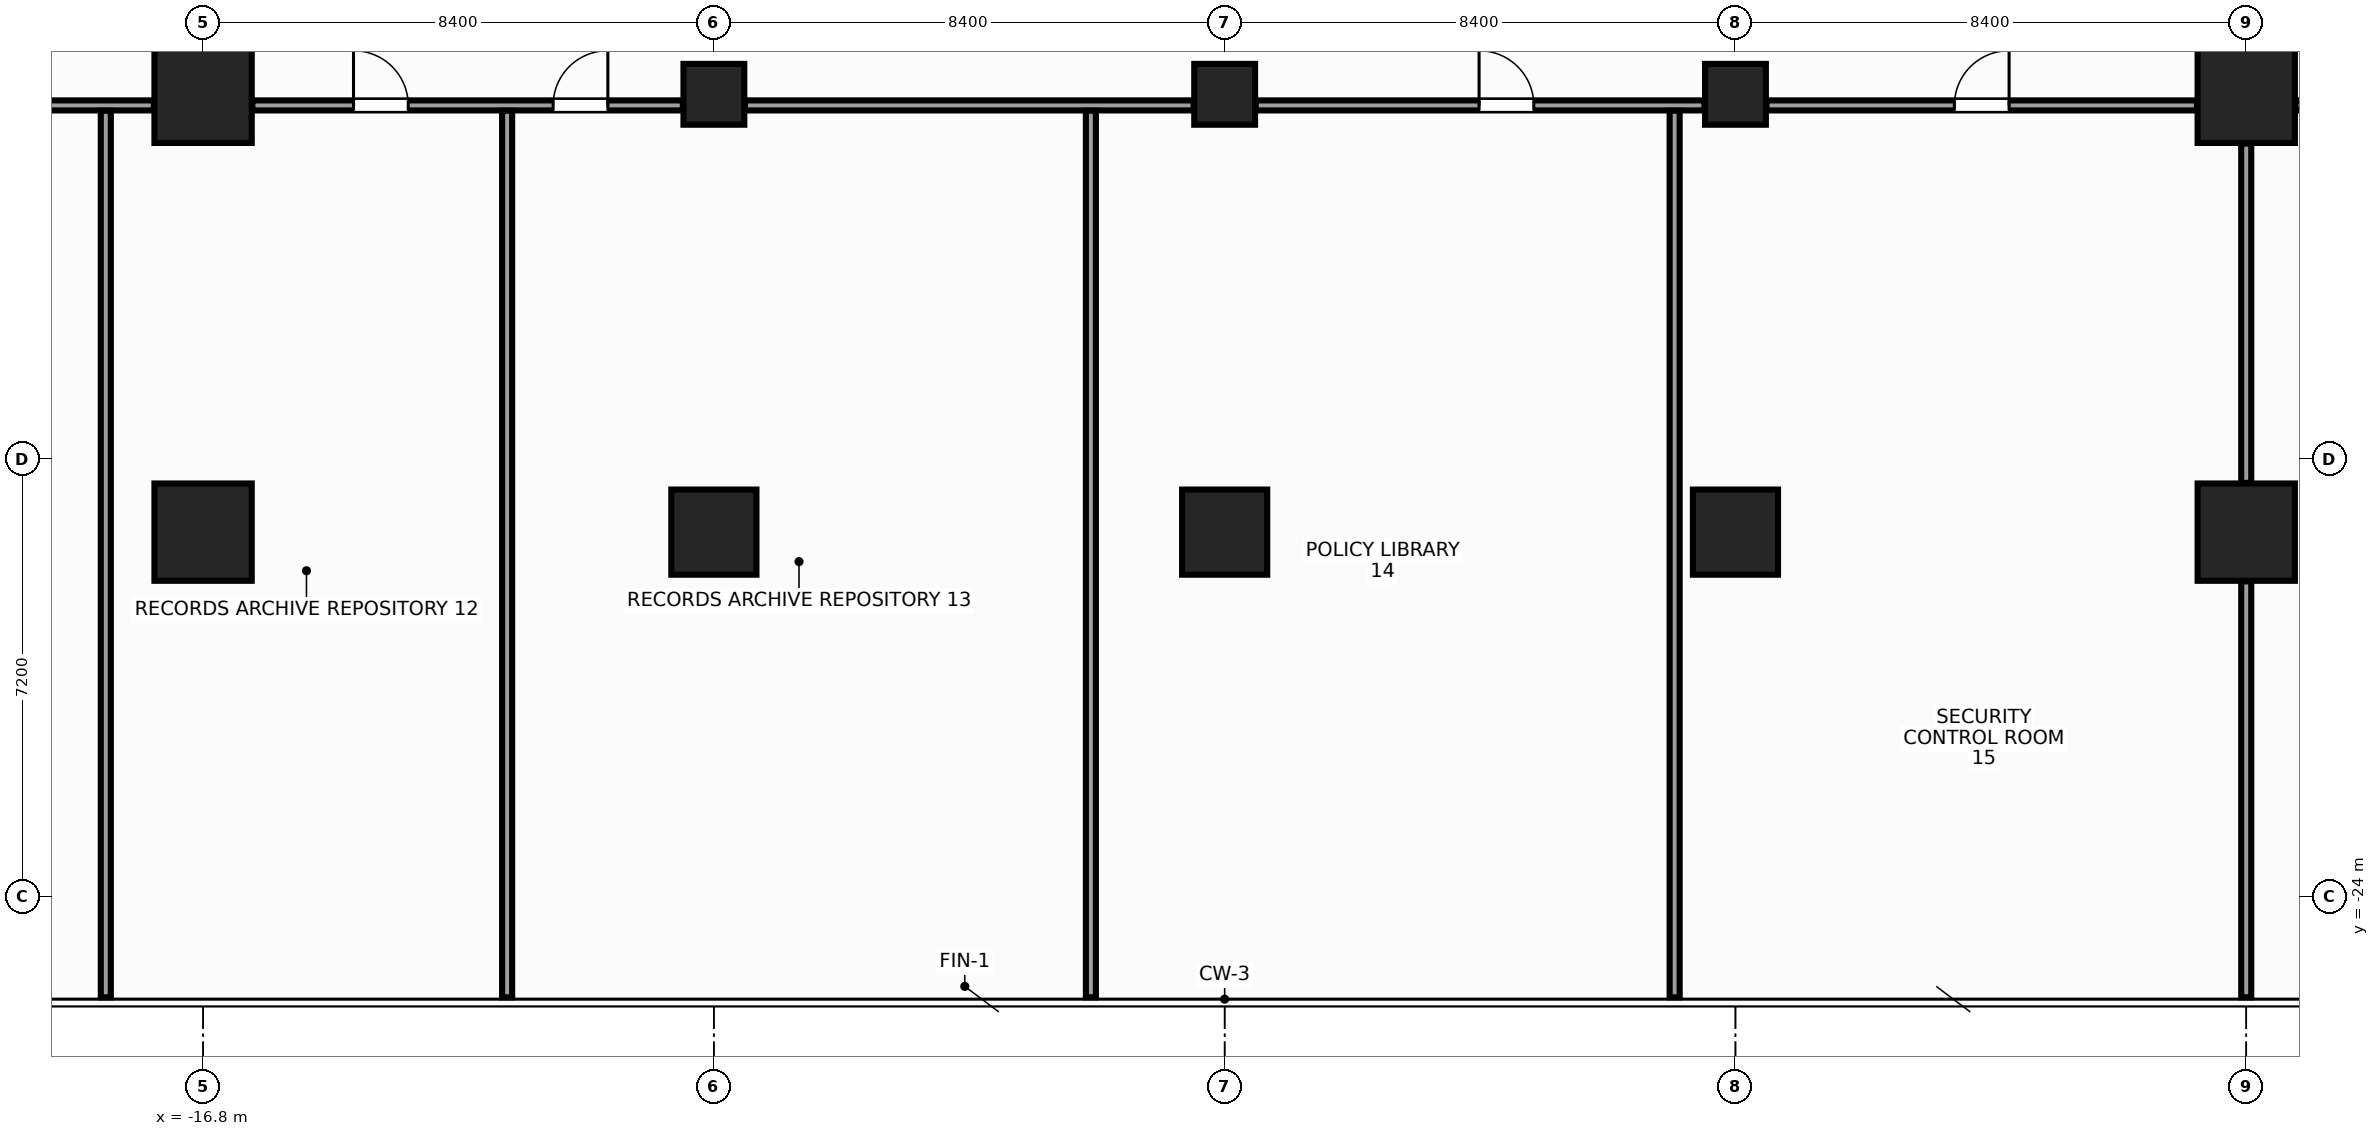
"""IFC4 building model, lengths in metres.
Left out: names, types, materials, properties, quantities, classifications, styles, units other than length and angle.
Written with IfcOpenShell. Run it as: python <this file> out.ifc"""

import sys

from ifc_helpers import new_model, si_unit, direction, frame, frame_2d, origin, origin_2d, place, context, subcontext, project, spatial, rectangle, hollow_rectangle, extrude, source, transform, mapped, element, fill, save


model = new_model("IFC4")
c1 = context("Model", 3, precision=1e-05, world=origin(), true_north=direction((0.0, 1.0)))
c2 = subcontext(c1, "Body", "Model", "MODEL_VIEW")
j1 = project(units=[si_unit("LENGTHUNIT", "METRE"), si_unit("PLANEANGLEUNIT", "RADIAN")], contexts=[c1])
p1 = place(None, origin())
s1 = spatial("IfcSite", under=j1, at=p1, CompositionType="ELEMENT")
p2 = place(p1, origin())
s2 = spatial("IfcBuilding", under=s1, at=p2, CompositionType="ELEMENT")
p3 = place(p2, frame((0.0, 0.0, 102.8)))
s3 = spatial("IfcBuildingStorey", under=s2, at=p3, CompositionType="ELEMENT", Elevation=102.8)
m1 = source(origin(), c2, "Body", "SweptSolid", [
    extrude(rectangle(XDim=1.6, YDim=1.6, at=origin_2d()), origin(), (0.0, 0.0, 1.0), 3.6),
])
for number, where, z_axis, x_axis in (
    (1, (-16.8, -18.0, 0.0), (0.0, 0.0, 1.0), (1.0, 0.0, 0.0)),
    (2, (-16.8, -10.8, 0.0), (0.0, 0.0, 1.0), (1.0, 0.0, 0.0)),
    (3, (16.8, -18.0, 0.0), (0.0, 0.0, 1.0), (1.0, 0.0, 0.0)),
    (4, (16.8, -10.8, 0.0), (0.0, 0.0, 1.0), (1.0, 0.0, 0.0)),
):
    element("IfcColumn", number, at=place(p3, frame(where, z_axis=z_axis, x_axis=x_axis)), inside=s3, PredefinedType="COLUMN", context=c2, shape_type="MappedRepresentation", body=[
        mapped(m1, transform((0.0, 0.0, 0.0), x_axis=(1.0, 0.0, 0.0), y_axis=(0.0, 1.0, 0.0), z_axis=(0.0, 0.0, 1.0), scale=1.0)),
    ])
m2 = source(origin(), c2, "Body", "SweptSolid", [
    extrude(rectangle(XDim=1.4, YDim=1.4, at=origin_2d()), origin(), (0.0, 0.0, 1.0), 3.6),
])
p4 = place(p3, frame((-8.4, -18.0, 0.0), z_axis=(0.0, 0.0, 1.0), x_axis=(1.0, 0.0, 0.0)))
e5 = element("IfcColumn", 5, at=p4, inside=s3, PredefinedType="COLUMN", context=c2, shape_type="MappedRepresentation", body=[
    mapped(m2, transform((0.0, 0.0, 0.0), x_axis=(1.0, 0.0, 0.0), y_axis=(0.0, 1.0, 0.0), z_axis=(0.0, 0.0, 1.0), scale=1.0)),
])
m3 = source(origin(), c2, "Body", "SweptSolid", [
    extrude(hollow_rectangle(XDim=1.0, YDim=1.0, WallThickness=0.045, at=origin_2d()), origin(), (0.0, 0.0, 1.0), 3.6),
])
p5 = place(p3, frame((-8.4, -10.8, 0.0), z_axis=(0.0, 0.0, 1.0), x_axis=(1.0, 0.0, 0.0)))
e6 = element("IfcColumn", 6, at=p5, inside=s3, PredefinedType="COLUMN", context=c2, shape_type="MappedRepresentation", body=[
    mapped(m3, transform((0.0, 0.0, 0.0), x_axis=(1.0, 0.0, 0.0), y_axis=(0.0, 1.0, 0.0), z_axis=(0.0, 0.0, 1.0), scale=1.0)),
])
p6 = place(p3, frame((8.4, -18.0, 0.0), z_axis=(0.0, 0.0, 1.0), x_axis=(1.0, 0.0, 0.0)))
e7 = element("IfcColumn", 7, at=p6, inside=s3, PredefinedType="COLUMN", context=c2, shape_type="MappedRepresentation", body=[
    mapped(m2, transform((0.0, 0.0, 0.0), x_axis=(1.0, 0.0, 0.0), y_axis=(0.0, 1.0, 0.0), z_axis=(0.0, 0.0, 1.0), scale=1.0)),
])
p7 = place(p3, frame((8.4, -10.8, 0.0), z_axis=(0.0, 0.0, 1.0), x_axis=(1.0, 0.0, 0.0)))
e8 = element("IfcColumn", 8, at=p7, inside=s3, PredefinedType="COLUMN", context=c2, shape_type="MappedRepresentation", body=[
    mapped(m3, transform((0.0, 0.0, 0.0), x_axis=(1.0, 0.0, 0.0), y_axis=(0.0, 1.0, 0.0), z_axis=(0.0, 0.0, 1.0), scale=1.0)),
])
p8 = place(p3, frame((0.0, -18.0, 0.0), z_axis=(0.0, 0.0, 1.0), x_axis=(1.0, 0.0, 0.0)))
e9 = element("IfcColumn", 9, at=p8, inside=s3, PredefinedType="COLUMN", context=c2, shape_type="MappedRepresentation", body=[
    mapped(m2, transform((0.0, 0.0, 0.0), x_axis=(1.0, 0.0, 0.0), y_axis=(0.0, 1.0, 0.0), z_axis=(0.0, 0.0, 1.0), scale=1.0)),
])
m4 = source(origin(), c2, "Body", "SweptSolid", [
    extrude(rectangle(XDim=1.0, YDim=1.0, at=origin_2d()), origin(), (0.0, 0.0, 1.0), 3.6),
])
p9 = place(p3, frame((0.0, -10.8, 0.0), z_axis=(0.0, 0.0, 1.0), x_axis=(1.0, 0.0, 0.0)))
e10 = element("IfcColumn", 10, at=p9, inside=s3, PredefinedType="COLUMN", context=c2, shape_type="MappedRepresentation", body=[
    mapped(m4, transform((0.0, 0.0, 0.0), x_axis=(1.0, 0.0, 0.0), y_axis=(0.0, 1.0, 0.0), z_axis=(0.0, 0.0, 1.0), scale=1.0)),
])
m5 = source(origin(), c2, "Body", "SweptSolid", [
    extrude(rectangle(XDim=3.155, YDim=0.165, at=frame_2d((1.577, 0.0))), origin(), (0.0, 0.0, 1.0), 2.745),
])
p10 = place(p3, frame((-20.765, -10.982, 0.0), z_axis=(0.0, 0.0, 1.0), x_axis=(1.0, 0.0, 0.0)))
e11 = element("IfcWall", 11, at=p10, inside=s3, PredefinedType="PARTITIONING", context=c2, shape_type="MappedRepresentation", body=[
    mapped(m5, transform((0.0, 0.0, 0.0), x_axis=(1.0, 0.0, 0.0), y_axis=(0.0, 1.0, 0.0), z_axis=(0.0, 0.0, 1.0), scale=1.0)),
])
m6 = source(origin(), c2, "Body", "SweptSolid", [
    extrude(rectangle(XDim=7.08, YDim=0.165, at=frame_2d((3.54, 0.0))), origin(), (0.0, 0.0, 1.0), 2.745),
])
p11 = place(p3, frame((-15.99, -10.982, 0.0), z_axis=(0.0, 0.0, 1.0), x_axis=(1.0, 0.0, 0.0)))
e12 = element("IfcWall", 12, at=p11, inside=s3, PredefinedType="PARTITIONING", context=c2, shape_type="MappedRepresentation", body=[
    mapped(m6, transform((0.0, 0.0, 0.0), x_axis=(1.0, 0.0, 0.0), y_axis=(0.0, 1.0, 0.0), z_axis=(0.0, 0.0, 1.0), scale=1.0)),
])
p12 = place(p11, frame((1.664, 0.0, 0.0)))
e13 = element("IfcOpeningElement", 13, at=p12, cuts=e12, PredefinedType="OPENING", context=c2, shape_type="SweptSolid", body=[
    extrude(rectangle(XDim=0.9, YDim=2.15, at=frame_2d((0.45, 1.075))), frame((0.0, 0.094, 0.0), z_axis=(0.0, -1.0, 0.0), x_axis=(1.0, 0.0, 0.0)), (0.0, 0.0, 1.0), 0.189),
])
p13 = place(p11, frame((4.946, 0.0, 0.0)))
e14 = element("IfcOpeningElement", 14, at=p13, cuts=e12, PredefinedType="OPENING", context=c2, shape_type="SweptSolid", body=[
    extrude(rectangle(XDim=0.9, YDim=2.15, at=frame_2d((0.45, 1.075))), frame((0.0, 0.094, 0.0), z_axis=(0.0, -1.0, 0.0), x_axis=(1.0, 0.0, 0.0)), (0.0, 0.0, 1.0), 0.189),
])
m7 = source(origin(), c2, "Body", "SweptSolid", [
    extrude(rectangle(XDim=7.38, YDim=0.165, at=frame_2d((3.69, 0.0))), origin(), (0.0, 0.0, 1.0), 2.745),
])
p14 = place(p3, frame((-7.89, -10.982, 0.0), z_axis=(0.0, 0.0, 1.0), x_axis=(1.0, 0.0, 0.0)))
e15 = element("IfcWall", 15, at=p14, inside=s3, PredefinedType="PARTITIONING", context=c2, shape_type="MappedRepresentation", body=[
    mapped(m7, transform((0.0, 0.0, 0.0), x_axis=(1.0, 0.0, 0.0), y_axis=(0.0, 1.0, 0.0), z_axis=(0.0, 0.0, 1.0), scale=1.0)),
])
p15 = place(p3, frame((0.51, -10.982, 0.0), z_axis=(0.0, 0.0, 1.0), x_axis=(1.0, 0.0, 0.0)))
e16 = element("IfcWall", 16, at=p15, inside=s3, PredefinedType="PARTITIONING", context=c2, shape_type="MappedRepresentation", body=[
    mapped(m7, transform((0.0, 0.0, 0.0), x_axis=(1.0, 0.0, 0.0), y_axis=(0.0, 1.0, 0.0), z_axis=(0.0, 0.0, 1.0), scale=1.0)),
])
p16 = place(p15, frame((3.674, 0.0, 0.0)))
e17 = element("IfcOpeningElement", 17, at=p16, cuts=e16, PredefinedType="OPENING", context=c2, shape_type="SweptSolid", body=[
    extrude(rectangle(XDim=0.9, YDim=2.15, at=frame_2d((0.45, 1.075))), frame((0.0, 0.094, 0.0), z_axis=(0.0, -1.0, 0.0), x_axis=(1.0, 0.0, 0.0)), (0.0, 0.0, 1.0), 0.189),
])
p17 = place(p3, frame((8.91, -10.982, 0.0), z_axis=(0.0, 0.0, 1.0), x_axis=(1.0, 0.0, 0.0)))
e18 = element("IfcWall", 18, at=p17, inside=s3, PredefinedType="PARTITIONING", context=c2, shape_type="MappedRepresentation", body=[
    mapped(m6, transform((0.0, 0.0, 0.0), x_axis=(1.0, 0.0, 0.0), y_axis=(0.0, 1.0, 0.0), z_axis=(0.0, 0.0, 1.0), scale=1.0)),
])
p18 = place(p17, frame((3.09, 0.0, 0.0)))
e19 = element("IfcOpeningElement", 19, at=p18, cuts=e18, PredefinedType="OPENING", context=c2, shape_type="SweptSolid", body=[
    extrude(rectangle(XDim=0.9, YDim=2.15, at=frame_2d((0.45, 1.075))), frame((0.0, 0.094, 0.0), z_axis=(0.0, -1.0, 0.0), x_axis=(1.0, 0.0, 0.0)), (0.0, 0.0, 1.0), 0.189),
])
p19 = place(p3, frame((17.61, -10.982, 0.0), z_axis=(0.0, 0.0, 1.0), x_axis=(1.0, 0.0, 0.0)))
e20 = element("IfcWall", 20, at=p19, inside=s3, PredefinedType="PARTITIONING", context=c2, shape_type="MappedRepresentation", body=[
    mapped(m5, transform((0.0, 0.0, 0.0), x_axis=(1.0, 0.0, 0.0), y_axis=(0.0, 1.0, 0.0), z_axis=(0.0, 0.0, 1.0), scale=1.0)),
])
m8 = source(origin(), c2, "Body", "SweptSolid", [
    extrude(rectangle(XDim=14.58, YDim=0.165, at=frame_2d((7.29, 0.0))), origin(), (0.0, 0.0, 1.0), 2.745),
])
for number, where, z_axis, x_axis in (
    (21, (-18.4, -25.65, 0.0), (0.0, 0.0, 1.0), (0.0, 1.0, 0.0)),
    (22, (-11.8, -25.65, 0.0), (0.0, 0.0, 1.0), (0.0, 1.0, 0.0)),
    (23, (-2.2, -25.65, 0.0), (0.0, 0.0, 1.0), (0.0, 1.0, 0.0)),
    (24, (7.4, -25.65, 0.0), (0.0, 0.0, 1.0), (0.0, 1.0, 0.0)),
):
    element("IfcWall", number, at=place(p3, frame(where, z_axis=z_axis, x_axis=x_axis)), inside=s3, PredefinedType="PARTITIONING", context=c2, shape_type="MappedRepresentation", body=[
        mapped(m8, transform((0.0, 0.0, 0.0), x_axis=(1.0, 0.0, 0.0), y_axis=(0.0, 1.0, 0.0), z_axis=(0.0, 0.0, 1.0), scale=1.0)),
    ])
m9 = source(origin(), c2, "Body", "SweptSolid", [
    extrude(rectangle(XDim=6.84, YDim=0.165, at=frame_2d((3.42, 0.0))), origin(), (0.0, 0.0, 1.0), 3.36),
])
p20 = place(p3, frame((16.8, -25.65, 0.0), z_axis=(0.0, 0.0, 1.0), x_axis=(0.0, 1.0, 0.0)))
e25 = element("IfcWall", 25, at=p20, inside=s3, PredefinedType="PARTITIONING", context=c2, shape_type="MappedRepresentation", body=[
    mapped(m9, transform((0.0, 0.0, 0.0), x_axis=(1.0, 0.0, 0.0), y_axis=(0.0, 1.0, 0.0), z_axis=(0.0, 0.0, 1.0), scale=1.0)),
])
m10 = source(origin(), c2, "Body", "SweptSolid", [
    extrude(rectangle(XDim=5.58, YDim=0.165, at=frame_2d((2.79, 0.0))), origin(), (0.0, 0.0, 1.0), 2.945),
])
p21 = place(p3, frame((16.8, -17.19, 0.0), z_axis=(0.0, 0.0, 1.0), x_axis=(0.0, 1.0, 0.0)))
e26 = element("IfcWall", 26, at=p21, inside=s3, PredefinedType="PARTITIONING", context=c2, shape_type="MappedRepresentation", body=[
    mapped(m10, transform((0.0, 0.0, 0.0), x_axis=(1.0, 0.0, 0.0), y_axis=(0.0, 1.0, 0.0), z_axis=(0.0, 0.0, 1.0), scale=1.0)),
])
m11 = source(origin(), c2, "Body", "SweptSolid", [
    extrude(rectangle(XDim=0.9, YDim=2.15, at=frame_2d((0.45, 1.075))), frame((0.0, 0.025, 0.0), z_axis=(0.0, -1.0, 0.0), x_axis=(1.0, 0.0, 0.0)), (0.0, 0.0, 1.0), 0.05),
])
p22 = place(p12, origin())
e27 = element("IfcDoor", 27, at=p22, inside=s3, OperationType="SINGLE_SWING_LEFT", PredefinedType="DOOR", context=c2, shape_type="MappedRepresentation", body=[
    mapped(m11, transform((0.0, 0.0, 0.0), x_axis=(1.0, 0.0, 0.0), y_axis=(0.0, 1.0, 0.0), z_axis=(0.0, 0.0, 1.0), scale=1.0)),
])
fill(e13, e27)
p23 = place(p13, origin())
e28 = element("IfcDoor", 28, at=p23, inside=s3, OperationType="SINGLE_SWING_RIGHT", PredefinedType="DOOR", context=c2, shape_type="MappedRepresentation", body=[
    mapped(m11, transform((0.0, 0.0, 0.0), x_axis=(1.0, 0.0, 0.0), y_axis=(0.0, 1.0, 0.0), z_axis=(0.0, 0.0, 1.0), scale=1.0)),
])
fill(e14, e28)
p24 = place(p16, origin())
e29 = element("IfcDoor", 29, at=p24, inside=s3, OperationType="SINGLE_SWING_LEFT", PredefinedType="DOOR", context=c2, shape_type="MappedRepresentation", body=[
    mapped(m11, transform((0.0, 0.0, 0.0), x_axis=(1.0, 0.0, 0.0), y_axis=(0.0, 1.0, 0.0), z_axis=(0.0, 0.0, 1.0), scale=1.0)),
])
fill(e17, e29)
p25 = place(p18, origin())
e30 = element("IfcDoor", 30, at=p25, inside=s3, OperationType="SINGLE_SWING_RIGHT", PredefinedType="DOOR", context=c2, shape_type="MappedRepresentation", body=[
    mapped(m11, transform((0.0, 0.0, 0.0), x_axis=(1.0, 0.0, 0.0), y_axis=(0.0, 1.0, 0.0), z_axis=(0.0, 0.0, 1.0), scale=1.0)),
])
fill(e19, e30)
save(model, sys.argv[1])
